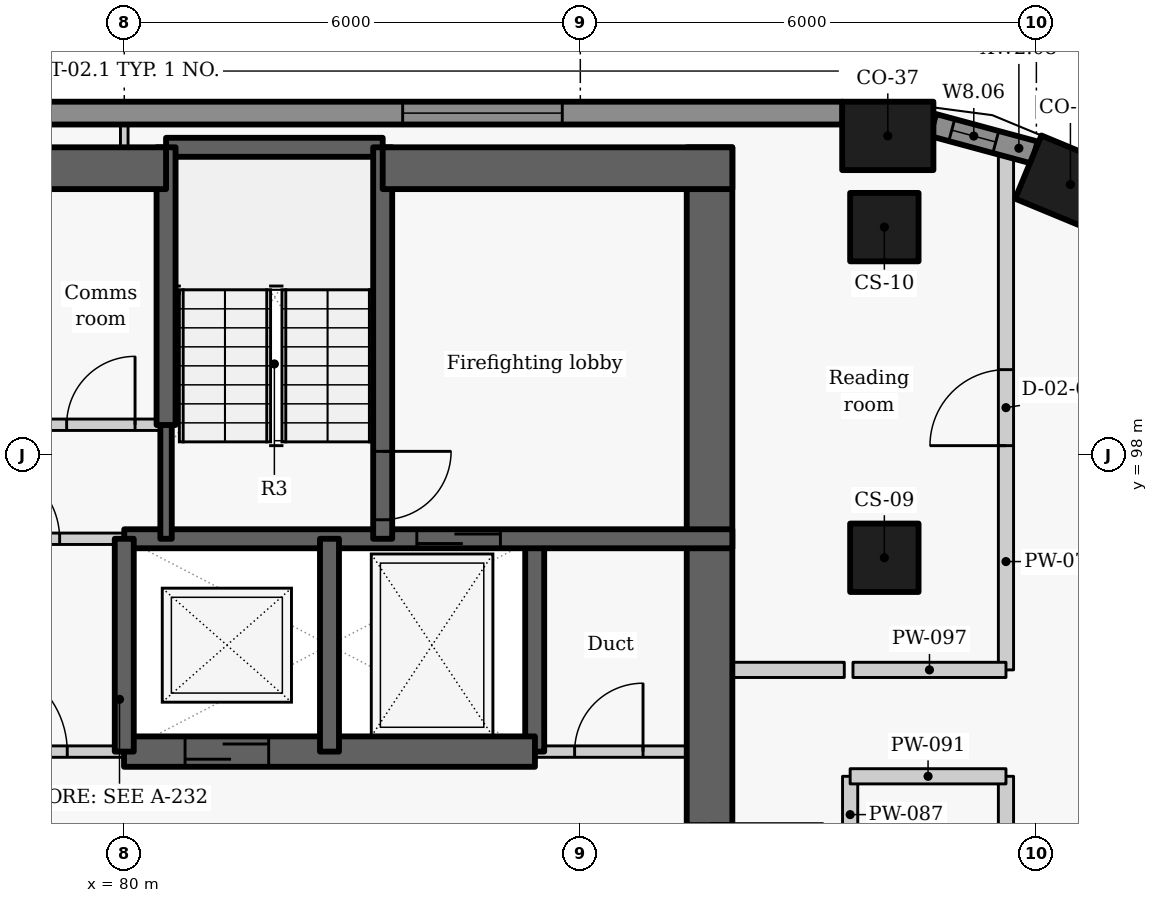
"""IFC4 building model, lengths in metres.
Left out: names, types, materials, properties, quantities, classifications, styles, units other than length and angle.
Written with IfcOpenShell. Run it as: python <this file> out.ifc"""

import sys

from ifc_helpers import new_model, si_unit, direction, frame, frame_2d, origin, origin_2d, place, context, subcontext, project, spatial, rectangle, extrude, element, fill, save


model = new_model("IFC4")
c1 = context("Model", 3, precision=1e-05, world=origin(), true_north=direction((0.0, 1.0)))
c2 = subcontext(c1, "Body", "Model", "MODEL_VIEW")
j1 = project(units=[si_unit("LENGTHUNIT", "METRE"), si_unit("PLANEANGLEUNIT", "RADIAN")], contexts=[c1])
p1 = place(None, origin())
s1 = spatial("IfcSite", under=j1, at=p1, CompositionType="ELEMENT")
p2 = place(p1, origin())
s2 = spatial("IfcBuilding", under=s1, at=p2, CompositionType="ELEMENT")
p3 = place(p2, frame((0.0, 0.0, 180.0)))
s3 = spatial("IfcBuildingStorey", under=s2, at=p3, CompositionType="ELEMENT", Elevation=180.0)
for number, where, z_axis, x_axis in (
    (1, (92.448, 101.56, 0.0), (0.0, 0.0, 1.0), (-0.924, 0.383, 0.0)),
    (2, (90.045, 102.2, 0.0), (0.0, 0.0, 1.0), (-1.0, 0.0, 0.0)),
):
    element("IfcColumn", number, at=place(p3, frame(where, z_axis=z_axis, x_axis=x_axis)), inside=s3, PredefinedType="COLUMN", context=c2, shape_type="SweptSolid", body=[
        extrude(rectangle(XDim=1.2, YDim=0.9, at=origin_2d()), origin(), (0.0, 0.0, 1.0), 3.3),
    ])
for number, where, z_axis, x_axis in (
    (3, (90.0, 96.65, 0.0), (0.0, 0.0, 1.0), (0.0, 1.0, 0.0)),
    (4, (90.0, 101.0, 0.0), (0.0, 0.0, 1.0), (0.0, 1.0, 0.0)),
):
    element("IfcColumn", number, at=place(p3, frame(where, z_axis=z_axis, x_axis=x_axis)), inside=s3, PredefinedType="COLUMN", context=c2, shape_type="SweptSolid", body=[
        extrude(rectangle(XDim=0.9, YDim=0.9, at=origin_2d()), origin(), (0.0, 0.0, 1.0), 3.3),
    ])
p4 = place(p3, frame((91.977, 101.981, 0.0), z_axis=(0.0, 0.0, 1.0), x_axis=(-0.965315341278, 0.261086751661, 0.0)))
e5 = element("IfcWall", 5, at=p4, inside=s3, PredefinedType="SOLIDWALL", context=c2, shape_type="SweptSolid", body=[
    extrude(rectangle(XDim=1.384, YDim=0.3, at=frame_2d((0.692, 0.0))), origin(), (0.0, 0.0, 1.0), 2.425),
])
p5 = place(p4, frame((0.529, 0.0, 0.9)))
e6 = element("IfcOpeningElement", 6, at=p5, cuts=e5, PredefinedType="OPENING", context=c2, shape_type="SweptSolid", body=[
    extrude(rectangle(XDim=0.6, YDim=1.1, at=frame_2d((0.3, 0.55))), frame((0.0, 0.16, 0.0), z_axis=(0.0, -1.0, 0.0), x_axis=(1.0, 0.0, 0.0)), (0.0, 0.0, 1.0), 0.32),
])
p6 = place(p3, frame((89.449, 102.5, 0.0), z_axis=(0.0, 0.0, 1.0), x_axis=(-1.0, 0.0, 0.0)))
e7 = element("IfcWall", 7, at=p6, inside=s3, PredefinedType="SOLIDWALL", context=c2, shape_type="SweptSolid", body=[
    extrude(rectangle(XDim=18.933, YDim=0.3, at=frame_2d((9.466, 0.0))), origin(), (0.0, 0.0, 1.0), 2.425),
])
p7 = place(p6, frame((3.687, 0.0, 0.9)))
e8 = element("IfcOpeningElement", 8, at=p7, cuts=e7, PredefinedType="OPENING", context=c2, shape_type="SweptSolid", body=[
    extrude(rectangle(XDim=2.1, YDim=1.1, at=frame_2d((1.05, 0.55))), frame((0.0, 0.16, 0.0), z_axis=(0.0, -1.0, 0.0), x_axis=(1.0, 0.0, 0.0)), (0.0, 0.0, 1.0), 0.32),
])
p8 = place(p6, frame((13.118, 0.0, 0.9)))
e9 = element("IfcOpeningElement", 9, at=p8, cuts=e7, PredefinedType="OPENING", context=c2, shape_type="SweptSolid", body=[
    extrude(rectangle(XDim=2.1, YDim=1.1, at=frame_2d((1.05, 0.55))), frame((0.0, 0.16, 0.0), z_axis=(0.0, -1.0, 0.0), x_axis=(1.0, 0.0, 0.0)), (0.0, 0.0, 1.0), 0.32),
])
p9 = place(p3, frame((85.4, 94.1, -0.275), z_axis=(0.0, 0.0, 1.0), x_axis=(0.0, 1.0, 0.0)))
e10 = element("IfcWall", 10, at=p9, inside=s3, PredefinedType="SHEAR", context=c2, shape_type="SweptSolid", body=[
    extrude(rectangle(XDim=2.8, YDim=0.25, at=frame_2d((1.4, 0.0))), origin(), (0.0, 0.0, 1.0), 3.3),
])
p10 = place(p3, frame((87.7, 102.05, -0.275), z_axis=(0.0, 0.0, 1.0), x_axis=(0.0, -1.0, 0.0)))
e11 = element("IfcWall", 11, at=p10, inside=s3, PredefinedType="SHEAR", context=c2, shape_type="SweptSolid", body=[
    extrude(rectangle(XDim=14.25, YDim=0.6, at=frame_2d((7.125, 0.0))), origin(), (0.0, 0.0, 1.0), 3.3),
])
p11 = place(p10, frame((8.898, 0.0, 0.275)))
e12 = element("IfcOpeningElement", 12, at=p11, cuts=e11, PredefinedType="OPENING", context=c2, shape_type="SweptSolid", body=[
    extrude(rectangle(XDim=1.5, YDim=2.1, at=frame_2d((0.75, 1.05))), frame((0.0, 0.31, 0.0), z_axis=(0.0, -1.0, 0.0), x_axis=(1.0, 0.0, 0.0)), (0.0, 0.0, 1.0), 0.62),
])
p12 = place(p3, frame((77.297, 94.1, 0.0), z_axis=(0.0, 0.0, 1.0), x_axis=(1.0, 0.0, 0.0)))
e13 = element("IfcWall", 13, at=p12, inside=s3, PredefinedType="PARTITIONING", context=c2, shape_type="SweptSolid", body=[
    extrude(rectangle(XDim=2.706, YDim=0.15, at=frame_2d((1.353, 0.0))), origin(), (0.0, 0.0, 1.0), 3.025),
])
p13 = place(p12, frame((0.753, 0.0, 0.0)))
e14 = element("IfcOpeningElement", 14, at=p13, cuts=e13, PredefinedType="OPENING", context=c2, shape_type="SweptSolid", body=[
    extrude(rectangle(XDim=1.2, YDim=2.1, at=frame_2d((0.6, 1.05))), frame((0.0, 0.085, 0.0), z_axis=(0.0, -1.0, 0.0), x_axis=(1.0, 0.0, 0.0)), (0.0, 0.0, 1.0), 0.17),
])
p14 = place(p3, frame((85.397, 94.1, 0.0), z_axis=(0.0, 0.0, 1.0), x_axis=(1.0, 0.0, 0.0)))
e15 = element("IfcWall", 15, at=p14, inside=s3, PredefinedType="PARTITIONING", context=c2, shape_type="SweptSolid", body=[
    extrude(rectangle(XDim=2.603, YDim=0.15, at=frame_2d((1.302, 0.0))), origin(), (0.0, 0.0, 1.0), 3.025),
])
p15 = place(p14, frame((0.528, 0.0, 0.0)))
e16 = element("IfcOpeningElement", 16, at=p15, cuts=e15, PredefinedType="OPENING", context=c2, shape_type="SweptSolid", body=[
    extrude(rectangle(XDim=0.9, YDim=2.1, at=frame_2d((0.45, 1.05))), frame((0.0, 0.085, 0.0), z_axis=(0.0, -1.0, 0.0), x_axis=(1.0, 0.0, 0.0)), (0.0, 0.0, 1.0), 0.17),
])
p16 = place(p3, frame((79.997, 94.1, -0.275), z_axis=(0.0, 0.0, 1.0), x_axis=(1.0, 0.0, 0.0)))
e17 = element("IfcWall", 17, at=p16, inside=s3, PredefinedType="SHEAR", context=c2, shape_type="SweptSolid", body=[
    extrude(rectangle(XDim=5.406, YDim=0.4, at=frame_2d((2.703, 0.0))), origin(), (0.0, 0.0, 1.0), 3.3),
])
p17 = place(p16, frame((0.803, 0.0, 0.275)))
e18 = element("IfcOpeningElement", 18, at=p17, cuts=e17, PredefinedType="OPENING", context=c2, shape_type="SweptSolid", body=[
    extrude(rectangle(XDim=1.1, YDim=2.1, at=frame_2d((0.55, 1.05))), frame((0.0, 0.21, 0.0), z_axis=(0.0, -1.0, 0.0), x_axis=(1.0, 0.0, 0.0)), (0.0, 0.0, 1.0), 0.42),
])
p18 = place(p3, frame((80.0, 96.9, -0.275), z_axis=(0.0, 0.0, 1.0), x_axis=(1.0, 0.0, 0.0)))
e19 = element("IfcWall", 19, at=p18, inside=s3, PredefinedType="SHEAR", context=c2, shape_type="SweptSolid", body=[
    extrude(rectangle(XDim=8.0, YDim=0.25, at=frame_2d((4.0, 0.0))), origin(), (0.0, 0.0, 1.0), 3.3),
])
p19 = place(p18, frame((3.849, 0.0, 0.275)))
e20 = element("IfcOpeningElement", 20, at=p19, cuts=e19, PredefinedType="OPENING", context=c2, shape_type="SweptSolid", body=[
    extrude(rectangle(XDim=1.1, YDim=2.1, at=frame_2d((0.55, 1.05))), frame((0.0, 0.135, 0.0), z_axis=(0.0, -1.0, 0.0), x_axis=(1.0, 0.0, 0.0)), (0.0, 0.0, 1.0), 0.27),
])
p20 = place(p3, frame((80.0, 94.1, -0.275), z_axis=(0.0, 0.0, 1.0), x_axis=(0.0, 1.0, 0.0)))
e21 = element("IfcWall", 21, at=p20, inside=s3, PredefinedType="SHEAR", context=c2, shape_type="SweptSolid", body=[
    extrude(rectangle(XDim=2.8, YDim=0.25, at=frame_2d((1.4, 0.0))), origin(), (0.0, 0.0, 1.0), 3.3),
])
p21 = place(p3, frame((77.3, 96.9, 0.0), z_axis=(0.0, 0.0, 1.0), x_axis=(1.0, 0.0, 0.0)))
e22 = element("IfcWall", 22, at=p21, inside=s3, PredefinedType="PARTITIONING", context=c2, shape_type="SweptSolid", body=[
    extrude(rectangle(XDim=2.7, YDim=0.15, at=frame_2d((1.35, 0.0))), origin(), (0.0, 0.0, 1.0), 3.025),
])
p22 = place(p21, frame((0.85, 0.0, 0.0)))
e23 = element("IfcOpeningElement", 23, at=p22, cuts=e22, PredefinedType="OPENING", context=c2, shape_type="SweptSolid", body=[
    extrude(rectangle(XDim=1.0, YDim=2.1, at=frame_2d((0.5, 1.05))), frame((0.0, 0.085, 0.0), z_axis=(0.0, -1.0, 0.0), x_axis=(1.0, 0.0, 0.0)), (0.0, 0.0, 1.0), 0.17),
])
p23 = place(p3, frame((82.7, 94.1, -0.275), z_axis=(0.0, 0.0, 1.0), x_axis=(0.0, 1.0, 0.0)))
e24 = element("IfcWall", 24, at=p23, inside=s3, PredefinedType="SHEAR", context=c2, shape_type="SweptSolid", body=[
    extrude(rectangle(XDim=2.8, YDim=0.25, at=frame_2d((1.4, 0.0))), origin(), (0.0, 0.0, 1.0), 3.3),
])
p24 = place(p3, frame((80.55, 102.05, -0.275), z_axis=(0.0, 0.0, 1.0), x_axis=(1.0, 0.0, 0.0)))
e25 = element("IfcWall", 25, at=p24, inside=s3, PredefinedType="SHEAR", context=c2, shape_type="SweptSolid", body=[
    extrude(rectangle(XDim=2.85, YDim=0.25, at=frame_2d((1.425, 0.0))), origin(), (0.0, 0.0, 1.0), 3.3),
])
p25 = place(p3, frame((83.4, 102.05, -0.275), z_axis=(0.0, 0.0, 1.0), x_axis=(0.0, -1.0, 0.0)))
e26 = element("IfcWall", 26, at=p25, inside=s3, PredefinedType="SHEAR", context=c2, shape_type="SweptSolid", body=[
    extrude(rectangle(XDim=5.15, YDim=0.25, at=frame_2d((2.575, 0.0))), origin(), (0.0, 0.0, 1.0), 3.3),
])
p26 = place(p25, frame((4.0, 0.0, 0.275)))
e27 = element("IfcOpeningElement", 27, at=p26, cuts=e26, PredefinedType="OPENING", context=c2, shape_type="SweptSolid", body=[
    extrude(rectangle(XDim=0.9, YDim=2.1, at=frame_2d((0.45, 1.05))), frame((0.0, 0.135, 0.0), z_axis=(0.0, -1.0, 0.0), x_axis=(1.0, 0.0, 0.0)), (0.0, 0.0, 1.0), 0.27),
])
p27 = place(p3, frame((80.55, 96.9, -0.275), z_axis=(0.0, 0.0, 1.0), x_axis=(0.0, 1.0, 0.0)))
e28 = element("IfcWall", 28, at=p27, inside=s3, PredefinedType="SHEAR", context=c2, shape_type="SweptSolid", body=[
    extrude(rectangle(XDim=1.503, YDim=0.15, at=frame_2d((0.751, 0.0))), origin(), (0.0, 0.0, 1.0), 3.3),
])
p28 = place(p3, frame((80.55, 98.397, -0.275), z_axis=(0.0, 0.0, 1.0), x_axis=(0.0, 1.0, 0.0)))
e29 = element("IfcWall", 29, at=p28, inside=s3, PredefinedType="SHEAR", context=c2, shape_type="SweptSolid", body=[
    extrude(rectangle(XDim=3.653, YDim=0.25, at=frame_2d((1.827, 0.0))), origin(), (0.0, 0.0, 1.0), 3.3),
])
p29 = place(p3, frame((75.35, 101.775, -0.275), z_axis=(0.0, 0.0, 1.0), x_axis=(1.0, 0.0, 0.0)))
e30 = element("IfcWall", 30, at=p29, inside=s3, PredefinedType="SHEAR", context=c2, shape_type="SweptSolid", body=[
    extrude(rectangle(XDim=5.2, YDim=0.55, at=frame_2d((2.6, 0.0))), origin(), (0.0, 0.0, 1.0), 3.3),
])
p30 = place(p3, frame((83.4, 101.775, -0.275), z_axis=(0.0, 0.0, 1.0), x_axis=(1.0, 0.0, 0.0)))
e31 = element("IfcWall", 31, at=p30, inside=s3, PredefinedType="SHEAR", context=c2, shape_type="SweptSolid", body=[
    extrude(rectangle(XDim=4.6, YDim=0.55, at=frame_2d((2.3, 0.0))), origin(), (0.0, 0.0, 1.0), 3.3),
])
p31 = place(p3, frame((75.35, 98.4, 0.0), z_axis=(0.0, 0.0, 1.0), x_axis=(1.0, 0.0, 0.0)))
e32 = element("IfcWall", 32, at=p31, inside=s3, PredefinedType="PARTITIONING", context=c2, shape_type="SweptSolid", body=[
    extrude(rectangle(XDim=5.2, YDim=0.15, at=frame_2d((2.6, 0.0))), origin(), (0.0, 0.0, 1.0), 3.025),
])
p32 = place(p31, frame((0.434, 0.0, 0.0)))
e33 = element("IfcOpeningElement", 33, at=p32, cuts=e32, PredefinedType="OPENING", context=c2, shape_type="SweptSolid", body=[
    extrude(rectangle(XDim=0.9, YDim=2.1, at=frame_2d((0.45, 1.05))), frame((0.0, 0.085, 0.0), z_axis=(0.0, -1.0, 0.0), x_axis=(1.0, 0.0, 0.0)), (0.0, 0.0, 1.0), 0.17),
])
p33 = place(p31, frame((2.176, 0.0, 0.0)))
e34 = element("IfcOpeningElement", 34, at=p33, cuts=e32, PredefinedType="OPENING", context=c2, shape_type="SweptSolid", body=[
    extrude(rectangle(XDim=0.9, YDim=2.1, at=frame_2d((0.45, 1.05))), frame((0.0, 0.085, 0.0), z_axis=(0.0, -1.0, 0.0), x_axis=(1.0, 0.0, 0.0)), (0.0, 0.0, 1.0), 0.17),
])
p34 = place(p31, frame((3.892, 0.0, 0.0)))
e35 = element("IfcOpeningElement", 35, at=p34, cuts=e32, PredefinedType="OPENING", context=c2, shape_type="SweptSolid", body=[
    extrude(rectangle(XDim=0.9, YDim=2.1, at=frame_2d((0.45, 1.05))), frame((0.0, 0.085, 0.0), z_axis=(0.0, -1.0, 0.0), x_axis=(1.0, 0.0, 0.0)), (0.0, 0.0, 1.0), 0.17),
])
p35 = place(p3, frame((91.6, 87.537, 0.0), z_axis=(0.0, 0.0, 1.0), x_axis=(0.0, 1.0, 0.0)))
e36 = element("IfcWall", 36, at=p35, inside=s3, PredefinedType="PARTITIONING", context=c2, shape_type="SweptSolid", body=[
    extrude(rectangle(XDim=6.238, YDim=0.2, at=frame_2d((3.119, 0.0))), origin(), (0.0, 0.0, 1.0), 3.025),
])
p36 = place(p35, frame((2.62, 0.0, 0.0)))
e37 = element("IfcOpeningElement", 37, at=p36, cuts=e36, PredefinedType="OPENING", context=c2, shape_type="SweptSolid", body=[
    extrude(rectangle(XDim=1.0, YDim=2.1, at=frame_2d((0.5, 1.05))), frame((0.0, 0.11, 0.0), z_axis=(0.0, -1.0, 0.0), x_axis=(1.0, 0.0, 0.0)), (0.0, 0.0, 1.0), 0.22),
])
p37 = place(p3, frame((91.6, 95.175, 0.0), z_axis=(0.0, 0.0, 1.0), x_axis=(0.0, 1.0, 0.0)))
e38 = element("IfcWall", 38, at=p37, inside=s3, PredefinedType="PARTITIONING", context=c2, shape_type="SweptSolid", body=[
    extrude(rectangle(XDim=6.899, YDim=0.2, at=frame_2d((3.449, 0.0))), origin(), (0.0, 0.0, 1.0), 2.405),
])
p38 = place(p37, frame((2.95, 0.0, 0.0)))
e39 = element("IfcOpeningElement", 39, at=p38, cuts=e38, PredefinedType="OPENING", context=c2, shape_type="SweptSolid", body=[
    extrude(rectangle(XDim=1.0, YDim=2.1, at=frame_2d((0.5, 1.05))), frame((0.0, 0.11, 0.0), z_axis=(0.0, -1.0, 0.0), x_axis=(1.0, 0.0, 0.0)), (0.0, 0.0, 1.0), 0.22),
])
p39 = place(p3, frame((89.55, 92.767, 0.0), z_axis=(0.0, 0.0, 1.0), x_axis=(0.0, 1.0, 0.0)))
e40 = element("IfcWall", 40, at=p39, inside=s3, PredefinedType="PARTITIONING", context=c2, shape_type="SweptSolid", body=[
    extrude(rectangle(XDim=1.008, YDim=0.2, at=frame_2d((0.504, 0.0))), origin(), (0.0, 0.0, 1.0), 3.025),
])
p40 = place(p3, frame((89.55, 93.775, 0.0), z_axis=(0.0, 0.0, 1.0), x_axis=(1.0, 0.0, 0.0)))
e41 = element("IfcWall", 41, at=p40, inside=s3, PredefinedType="PARTITIONING", context=c2, shape_type="SweptSolid", body=[
    extrude(rectangle(XDim=2.05, YDim=0.2, at=frame_2d((1.025, 0.0))), origin(), (0.0, 0.0, 1.0), 2.505),
])
p41 = place(p3, frame((88.0, 95.175, 0.0), z_axis=(0.0, 0.0, 1.0), x_axis=(1.0, 0.0, 0.0)))
e42 = element("IfcWall", 42, at=p41, inside=s3, PredefinedType="PARTITIONING", context=c2, shape_type="SweptSolid", body=[
    extrude(rectangle(XDim=1.473, YDim=0.2, at=frame_2d((0.736, 0.0))), origin(), (0.0, 0.0, 1.0), 3.025),
])
p42 = place(p3, frame((89.587, 95.175, 0.0), z_axis=(0.0, 0.0, 1.0), x_axis=(1.0, 0.0, 0.0)))
e43 = element("IfcWall", 43, at=p42, inside=s3, PredefinedType="PARTITIONING", context=c2, shape_type="SweptSolid", body=[
    extrude(rectangle(XDim=2.013, YDim=0.2, at=frame_2d((1.006, 0.0))), origin(), (0.0, 0.0, 1.0), 2.505),
])
p43 = place(p3, frame((80.0, 102.05, 0.0), z_axis=(0.0, 0.0, 1.0), x_axis=(0.0, 1.0, 0.0)))
e44 = element("IfcWall", 44, at=p43, inside=s3, PredefinedType="PARTITIONING", context=c2, shape_type="SweptSolid", body=[
    extrude(rectangle(XDim=0.3, YDim=0.1, at=frame_2d((0.15, 0.0))), origin(), (0.0, 0.0, 1.0), 3.025),
])
p44 = place(p5, origin())
e45 = element("IfcWindow", 45, at=p44, inside=s3, PartitioningType="SINGLE_PANEL", PredefinedType="WINDOW", context=c2, shape_type="SweptSolid", body=[
    extrude(rectangle(XDim=0.6, YDim=1.1, at=frame_2d((0.3, 0.55))), frame((0.0, 0.03, 0.0), z_axis=(0.0, -1.0, 0.0), x_axis=(1.0, 0.0, 0.0)), (0.0, 0.0, 1.0), 0.06),
])
fill(e6, e45)
p45 = place(p7, origin())
e46 = element("IfcWindow", 46, at=p45, inside=s3, PartitioningType="SINGLE_PANEL", PredefinedType="WINDOW", context=c2, shape_type="SweptSolid", body=[
    extrude(rectangle(XDim=2.1, YDim=1.1, at=frame_2d((1.05, 0.55))), frame((0.0, 0.03, 0.0), z_axis=(0.0, -1.0, 0.0), x_axis=(1.0, 0.0, 0.0)), (0.0, 0.0, 1.0), 0.06),
])
fill(e8, e46)
p46 = place(p13, origin())
e47 = element("IfcDoor", 47, at=p46, inside=s3, OperationType="DOUBLE_DOOR_SINGLE_SWING", PredefinedType="DOOR", context=c2, shape_type="SweptSolid", body=[
    extrude(rectangle(XDim=1.2, YDim=2.1, at=frame_2d((0.6, 1.05))), frame((0.0, 0.025, 0.0), z_axis=(0.0, -1.0, 0.0), x_axis=(1.0, 0.0, 0.0)), (0.0, 0.0, 1.0), 0.05),
])
fill(e14, e47)
p47 = place(p17, origin())
e48 = element("IfcDoor", 48, at=p47, inside=s3, OperationType="SLIDING_TO_LEFT", PredefinedType="DOOR", context=c2, shape_type="SweptSolid", body=[
    extrude(rectangle(XDim=1.1, YDim=2.1, at=frame_2d((0.55, 1.05))), frame((0.0, 0.025, 0.0), z_axis=(0.0, -1.0, 0.0), x_axis=(1.0, 0.0, 0.0)), (0.0, 0.0, 1.0), 0.05),
])
fill(e18, e48)
p48 = place(p19, origin())
e49 = element("IfcDoor", 49, at=p48, inside=s3, OperationType="SLIDING_TO_LEFT", PredefinedType="DOOR", context=c2, shape_type="SweptSolid", body=[
    extrude(rectangle(XDim=1.1, YDim=2.1, at=frame_2d((0.55, 1.05))), frame((0.0, 0.025, 0.0), z_axis=(0.0, -1.0, 0.0), x_axis=(1.0, 0.0, 0.0)), (0.0, 0.0, 1.0), 0.05),
])
fill(e20, e49)
p49 = place(p15, origin())
e50 = element("IfcDoor", 50, at=p49, inside=s3, OperationType="SINGLE_SWING_RIGHT", PredefinedType="DOOR", context=c2, shape_type="SweptSolid", body=[
    extrude(rectangle(XDim=0.9, YDim=2.1, at=frame_2d((0.45, 1.05))), frame((0.0, 0.025, 0.0), z_axis=(0.0, -1.0, 0.0), x_axis=(1.0, 0.0, 0.0)), (0.0, 0.0, 1.0), 0.05),
])
fill(e16, e50)
p50 = place(p22, origin())
e51 = element("IfcDoor", 51, at=p50, inside=s3, OperationType="SINGLE_SWING_LEFT", PredefinedType="DOOR", context=c2, shape_type="SweptSolid", body=[
    extrude(rectangle(XDim=1.0, YDim=2.1, at=frame_2d((0.5, 1.05))), frame((0.0, 0.025, 0.0), z_axis=(0.0, -1.0, 0.0), x_axis=(1.0, 0.0, 0.0)), (0.0, 0.0, 1.0), 0.05),
])
fill(e23, e51)
p51 = place(p34, origin())
e52 = element("IfcDoor", 52, at=p51, inside=s3, OperationType="SINGLE_SWING_RIGHT", PredefinedType="DOOR", context=c2, shape_type="SweptSolid", body=[
    extrude(rectangle(XDim=0.9, YDim=2.1, at=frame_2d((0.45, 1.05))), frame((0.0, 0.025, 0.0), z_axis=(0.0, -1.0, 0.0), x_axis=(1.0, 0.0, 0.0)), (0.0, 0.0, 1.0), 0.05),
])
fill(e35, e52)
p52 = place(p26, origin())
e53 = element("IfcDoor", 53, at=p52, inside=s3, OperationType="SINGLE_SWING_LEFT", PredefinedType="DOOR", context=c2, shape_type="SweptSolid", body=[
    extrude(rectangle(XDim=0.9, YDim=2.1, at=frame_2d((0.45, 1.05))), frame((0.0, 0.025, 0.0), z_axis=(0.0, -1.0, 0.0), x_axis=(1.0, 0.0, 0.0)), (0.0, 0.0, 1.0), 0.05),
])
fill(e27, e53)
p53 = place(p38, origin())
e54 = element("IfcDoor", 54, at=p53, inside=s3, OperationType="SINGLE_SWING_LEFT", PredefinedType="DOOR", context=c2, shape_type="SweptSolid", body=[
    extrude(rectangle(XDim=1.0, YDim=2.1, at=frame_2d((0.5, 1.05))), frame((0.0, 0.025, 0.0), z_axis=(0.0, -1.0, 0.0), x_axis=(1.0, 0.0, 0.0)), (0.0, 0.0, 1.0), 0.05),
])
fill(e39, e54)
p54 = place(p11, origin())
e55 = element("IfcDoor", 55, at=p54, inside=s3, OperationType="DOUBLE_DOOR_SINGLE_SWING", PredefinedType="DOOR", context=c2, shape_type="SweptSolid", body=[
    extrude(rectangle(XDim=1.5, YDim=2.1, at=frame_2d((0.75, 1.05))), frame((0.0, 0.025, 0.0), z_axis=(0.0, -1.0, 0.0), x_axis=(1.0, 0.0, 0.0)), (0.0, 0.0, 1.0), 0.05),
])
fill(e12, e55)
save(model, sys.argv[1])
